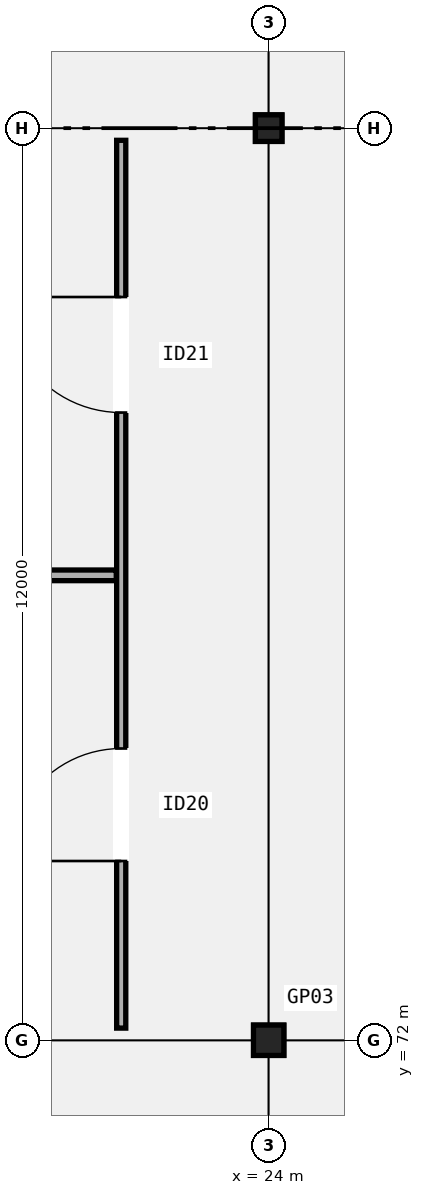
"""IFC4 building model, lengths in metres.
Left out: names, types, materials, properties, quantities, classifications, styles, units other than length and angle.
Written with IfcOpenShell. Run it as: python <this file> out.ifc"""

import sys

from ifc_helpers import new_model, si_unit, direction, frame, frame_2d, origin, origin_2d, place, context, subcontext, project, spatial, rectangle, hollow_rectangle, extrude, element, fill, save


model = new_model("IFC4")
c1 = context("Model", 3, precision=1e-05, world=origin(), true_north=direction((0.0, 1.0)))
c2 = subcontext(c1, "Body", "Model", "MODEL_VIEW")
j1 = project(units=[si_unit("LENGTHUNIT", "METRE"), si_unit("PLANEANGLEUNIT", "RADIAN")], contexts=[c1])
p1 = place(None, origin())
s1 = spatial("IfcSite", under=j1, at=p1, CompositionType="ELEMENT")
p2 = place(p1, origin())
s2 = spatial("IfcBuilding", under=s1, at=p2, CompositionType="ELEMENT")
p3 = place(p2, frame((0.0, 0.0, 20.4)))
s3 = spatial("IfcBuildingStorey", under=s2, at=p3, CompositionType="ELEMENT", Elevation=20.4)
p4 = place(p3, frame((24.0, 72.0, 0.0), z_axis=(0.0, 0.0, 1.0), x_axis=(1.0, 0.0, 0.0)))
e1 = element("IfcColumn", 1, at=p4, inside=s3, PredefinedType="COLUMN", context=c2, shape_type="SweptSolid", body=[
    extrude(hollow_rectangle(XDim=0.4, YDim=0.4, WallThickness=0.016, InnerFilletRadius=0.016, OuterFilletRadius=0.032, at=origin_2d()), origin(), (0.0, 0.0, 1.0), 5.4),
])
p5 = place(p3, frame((24.0, 84.0, 0.0), z_axis=(0.0, 0.0, 1.0), x_axis=(1.0, 0.0, 0.0)))
e2 = element("IfcColumn", 2, at=p5, inside=s3, PredefinedType="COLUMN", context=c2, shape_type="SweptSolid", body=[
    extrude(hollow_rectangle(XDim=0.35, YDim=0.35, WallThickness=0.016, InnerFilletRadius=0.016, OuterFilletRadius=0.032, at=origin_2d()), origin(), (0.0, 0.0, 1.0), 5.4),
])
p6 = place(p3, frame((22.06, 72.16, 0.0), z_axis=(0.0, 0.0, 1.0), x_axis=(0.0, 1.0, 0.0)))
e3 = element("IfcWall", 3, at=p6, inside=s3, PredefinedType="PARTITIONING", context=c2, shape_type="SweptSolid", body=[
    extrude(rectangle(XDim=11.68, YDim=0.12, at=frame_2d((5.84, 0.0))), origin(), (0.0, 0.0, 1.0), 4.52),
])
p7 = place(p6, frame((2.198, 0.0, 0.0)))
e4 = element("IfcOpeningElement", 4, at=p7, cuts=e3, PredefinedType="OPENING", context=c2, shape_type="SweptSolid", body=[
    extrude(rectangle(XDim=1.48, YDim=2.24, at=frame_2d((0.74, 1.12))), frame((0.0, 0.07, 0.0), z_axis=(0.0, -1.0, 0.0), x_axis=(1.0, 0.0, 0.0)), (0.0, 0.0, 1.0), 0.14),
])
p8 = place(p6, frame((8.098, 0.0, 0.0)))
e5 = element("IfcOpeningElement", 5, at=p8, cuts=e3, PredefinedType="OPENING", context=c2, shape_type="SweptSolid", body=[
    extrude(rectangle(XDim=1.52, YDim=2.28, at=frame_2d((0.76, 1.14))), frame((0.0, 0.07, 0.0), z_axis=(0.0, -1.0, 0.0), x_axis=(1.0, 0.0, 0.0)), (0.0, 0.0, 1.0), 0.14),
])
p9 = place(p3, frame((12.024, 78.117, 0.0), z_axis=(0.0, 0.0, 1.0), x_axis=(1.0, 0.0, 0.0)))
e6 = element("IfcWall", 6, at=p9, inside=s3, PredefinedType="PARTITIONING", context=c2, shape_type="SweptSolid", body=[
    extrude(rectangle(XDim=9.971, YDim=0.14, at=frame_2d((4.986, 0.0))), origin(), (0.0, 0.0, 1.0), 4.52),
])
p10 = place(p7, origin())
e7 = element("IfcDoor", 7, at=p10, inside=s3, OperationType="SINGLE_SWING_LEFT", PredefinedType="DOOR", context=c2, shape_type="SweptSolid", body=[
    extrude(rectangle(XDim=1.48, YDim=2.24, at=frame_2d((0.74, 1.12))), frame((0.0, 0.025, 0.0), z_axis=(0.0, -1.0, 0.0), x_axis=(1.0, 0.0, 0.0)), (0.0, 0.0, 1.0), 0.05),
])
fill(e4, e7)
p11 = place(p8, origin())
e8 = element("IfcDoor", 8, at=p11, inside=s3, OperationType="SINGLE_SWING_RIGHT", PredefinedType="DOOR", context=c2, shape_type="SweptSolid", body=[
    extrude(rectangle(XDim=1.52, YDim=2.28, at=frame_2d((0.76, 1.14))), frame((0.0, 0.025, 0.0), z_axis=(0.0, -1.0, 0.0), x_axis=(1.0, 0.0, 0.0)), (0.0, 0.0, 1.0), 0.05),
])
fill(e5, e8)
save(model, sys.argv[1])
